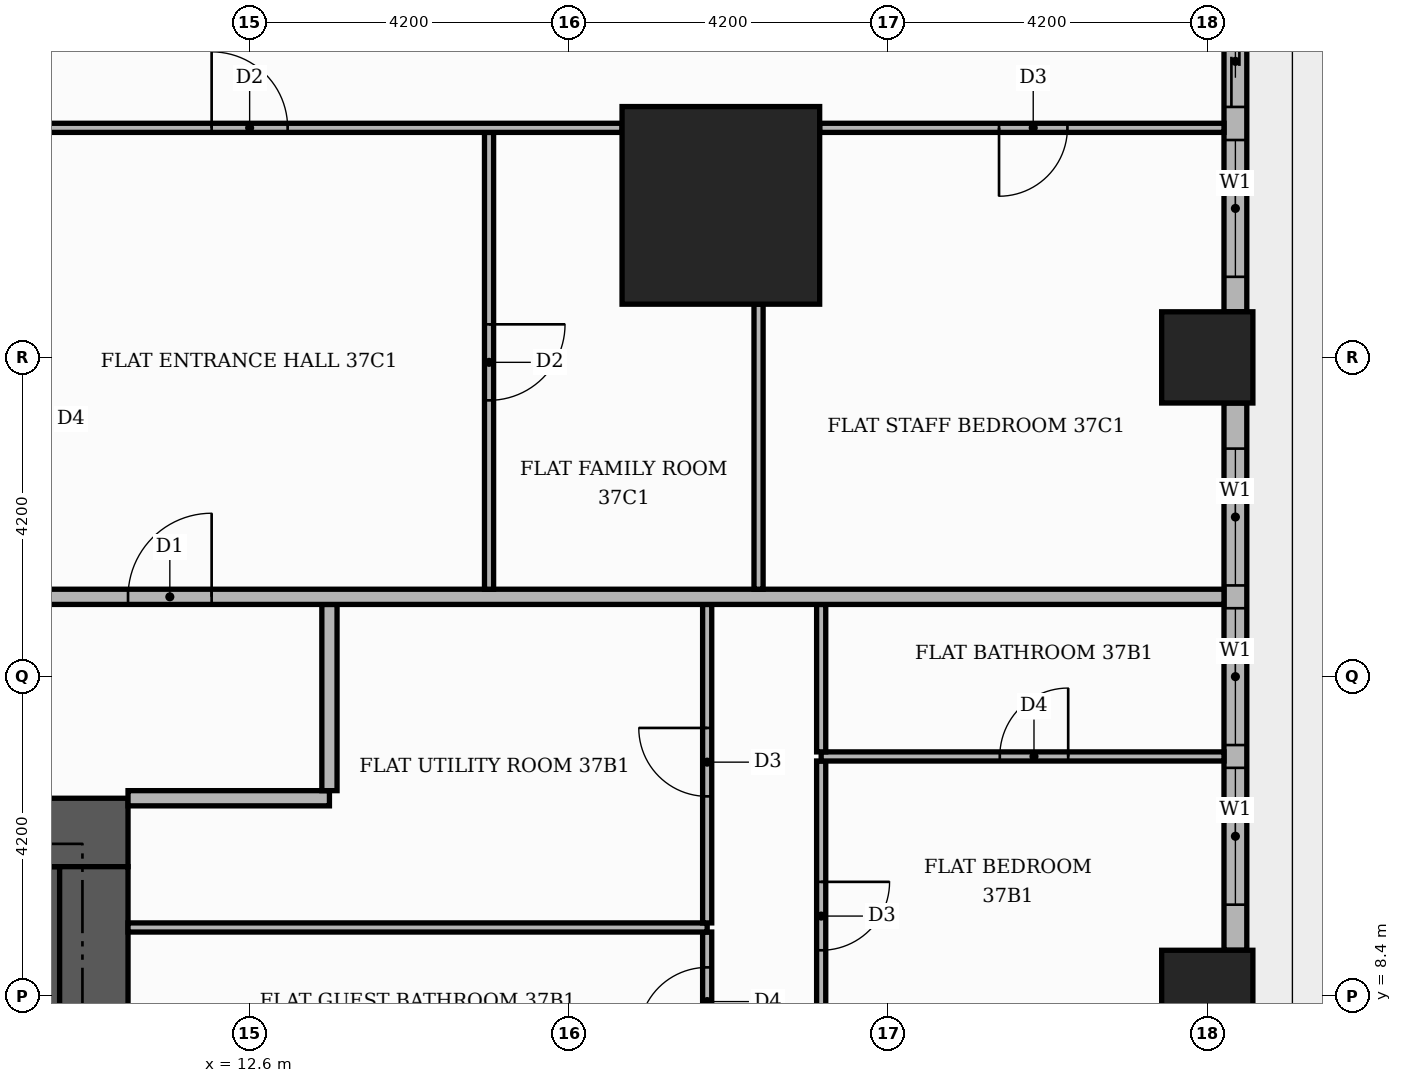
"""IFC4 building model, lengths in metres.
Left out: names, types, materials, properties, quantities, classifications, styles, units other than length and angle.
Written with IfcOpenShell. Run it as: python <this file> out.ifc"""

import sys

from ifc_helpers import new_model, si_unit, direction, frame, frame_2d, origin, origin_2d, place, context, subcontext, project, spatial, rectangle, extrude, element, fill, save


model = new_model("IFC4")
c1 = context("Model", 3, precision=1e-05, world=origin(), true_north=direction((0.0, 1.0)))
c2 = subcontext(c1, "Body", "Model", "MODEL_VIEW")
j1 = project(units=[si_unit("LENGTHUNIT", "METRE"), si_unit("PLANEANGLEUNIT", "RADIAN")], contexts=[c1])
p1 = place(None, origin())
s1 = spatial("IfcSite", under=j1, at=p1, CompositionType="ELEMENT")
p2 = place(p1, origin())
s2 = spatial("IfcBuilding", under=s1, at=p2, CompositionType="ELEMENT")
p3 = place(p2, frame((0.0, 0.0, 157.2)))
s3 = spatial("IfcBuildingStorey", under=s2, at=p3, CompositionType="ELEMENT", Elevation=157.2)
p4 = place(p3, frame((5.5, 9.15, 0.0), z_axis=(0.0, 0.0, 1.0), x_axis=(1.0, 0.0, 0.0)))
e1 = element("IfcWall", 1, at=p4, inside=s3, PredefinedType="SHEAR", context=c2, shape_type="SweptSolid", body=[
    extrude(rectangle(XDim=4.6, YDim=1.9, at=frame_2d((2.3, 0.0))), origin(), (0.0, 0.0, 1.0), 3.48),
])
p5 = place(p3, frame((-11.0, 10.55, 0.0), z_axis=(0.0, 0.0, 1.0), x_axis=(1.0, 0.0, 0.0)))
e2 = element("IfcWall", 2, at=p5, inside=s3, PredefinedType="SHEAR", context=c2, shape_type="SweptSolid", body=[
    extrude(rectangle(XDim=22.0, YDim=0.9, at=frame_2d((11.0, 0.0))), origin(), (0.0, 0.0, 1.0), 3.48),
])
p6 = place(p5, frame((13.3, 0.0, 0.0)))
e3 = element("IfcOpeningElement", 3, at=p6, cuts=e2, PredefinedType="OPENING", context=c2, shape_type="SweptSolid", body=[
    extrude(rectangle(XDim=1.8, YDim=2.2, at=frame_2d((0.9, 1.1))), frame((0.0, 0.46, 0.0), z_axis=(0.0, -1.0, 0.0), x_axis=(1.0, 0.0, 0.0)), (0.0, 0.0, 1.0), 0.92),
])
p7 = place(p3, frame((10.55, -10.1, 0.0), z_axis=(0.0, 0.0, 1.0), x_axis=(0.0, 1.0, 0.0)))
e4 = element("IfcWall", 4, at=p7, inside=s3, PredefinedType="SHEAR", context=c2, shape_type="SweptSolid", body=[
    extrude(rectangle(XDim=20.2, YDim=0.9, at=frame_2d((10.1, 0.0))), origin(), (0.0, 0.0, 1.0), 3.48),
])
p8 = place(p3, frame((18.8, 18.8, 0.0), z_axis=(0.0, 0.0, 1.0), x_axis=(1.0, 0.0, 0.0)))
e5 = element("IfcColumn", 5, at=p8, inside=s3, PredefinedType="COLUMN", context=c2, shape_type="SweptSolid", body=[
    extrude(rectangle(XDim=2.6, YDim=2.6, at=origin_2d()), origin(), (0.0, 0.0, 1.0), 3.9),
])
for number, where, z_axis, x_axis in (
    (6, (25.2, 8.4, 0.0), (0.0, 0.0, 1.0), (1.0, 0.0, 0.0)),
    (7, (25.2, 16.8, 0.0), (0.0, 0.0, 1.0), (1.0, 0.0, 0.0)),
):
    element("IfcColumn", number, at=place(p3, frame(where, z_axis=z_axis, x_axis=x_axis)), inside=s3, PredefinedType="COLUMN", context=c2, shape_type="SweptSolid", body=[
        extrude(rectangle(XDim=1.2, YDim=1.2, at=origin_2d()), origin(), (0.0, 0.0, 1.0), 3.9),
    ])
p9 = place(p3, frame((25.57, 9.0, 0.0), z_axis=(0.0, 0.0, 1.0), x_axis=(0.0, 1.0, 0.0)))
e8 = element("IfcWall", 8, at=p9, inside=s3, PredefinedType="STANDARD", context=c2, shape_type="SweptSolid", body=[
    extrude(rectangle(XDim=7.2, YDim=0.3, at=frame_2d((3.6, 0.0))), origin(), (0.0, 0.0, 1.0), 3.48),
])
p10 = place(p9, frame((0.6, 0.0, 0.9)))
e9 = element("IfcOpeningElement", 9, at=p10, cuts=e8, PredefinedType="OPENING", context=c2, shape_type="SweptSolid", body=[
    extrude(rectangle(XDim=1.8, YDim=2.1, at=frame_2d((0.9, 1.05))), frame((0.0, 0.16, 0.0), z_axis=(0.0, -1.0, 0.0), x_axis=(1.0, 0.0, 0.0)), (0.0, 0.0, 1.0), 0.32),
])
p11 = place(p9, frame((2.7, 0.0, 0.9)))
e10 = element("IfcOpeningElement", 10, at=p11, cuts=e8, PredefinedType="OPENING", context=c2, shape_type="SweptSolid", body=[
    extrude(rectangle(XDim=1.8, YDim=2.1, at=frame_2d((0.9, 1.05))), frame((0.0, 0.16, 0.0), z_axis=(0.0, -1.0, 0.0), x_axis=(1.0, 0.0, 0.0)), (0.0, 0.0, 1.0), 0.32),
])
p12 = place(p9, frame((4.8, 0.0, 0.9)))
e11 = element("IfcOpeningElement", 11, at=p12, cuts=e8, PredefinedType="OPENING", context=c2, shape_type="SweptSolid", body=[
    extrude(rectangle(XDim=1.8, YDim=2.1, at=frame_2d((0.9, 1.05))), frame((0.0, 0.16, 0.0), z_axis=(0.0, -1.0, 0.0), x_axis=(1.0, 0.0, 0.0)), (0.0, 0.0, 1.0), 0.32),
])
p13 = place(p3, frame((25.57, 17.4, 0.0), z_axis=(0.0, 0.0, 1.0), x_axis=(0.0, 1.0, 0.0)))
e12 = element("IfcWall", 12, at=p13, inside=s3, PredefinedType="STANDARD", context=c2, shape_type="SweptSolid", body=[
    extrude(rectangle(XDim=4.32, YDim=0.3, at=frame_2d((2.16, 0.0))), origin(), (0.0, 0.0, 1.0), 3.48),
])
p14 = place(p13, frame((2.695, 0.0, 0.0)))
e13 = element("IfcOpeningElement", 13, at=p14, cuts=e12, PredefinedType="OPENING", context=c2, shape_type="SweptSolid", body=[
    extrude(rectangle(XDim=1.2, YDim=2.4, at=frame_2d((0.6, 1.2))), frame((0.0, 0.16, 0.0), z_axis=(0.0, -1.0, 0.0), x_axis=(1.0, 0.0, 0.0)), (0.0, 0.0, 1.0), 0.32),
])
p15 = place(p13, frame((0.46, 0.0, 0.9)))
e14 = element("IfcOpeningElement", 14, at=p15, cuts=e12, PredefinedType="OPENING", context=c2, shape_type="SweptSolid", body=[
    extrude(rectangle(XDim=1.8, YDim=2.1, at=frame_2d((0.9, 1.05))), frame((0.0, 0.16, 0.0), z_axis=(0.0, -1.0, 0.0), x_axis=(1.0, 0.0, 0.0)), (0.0, 0.0, 1.0), 0.32),
])
p16 = place(p3, frame((18.62, 7.41, 0.0), z_axis=(0.0, 0.0, 1.0), x_axis=(0.0, 1.0, 0.0)))
e15 = element("IfcWall", 15, at=p16, inside=s3, PredefinedType="PARTITIONING", context=c2, shape_type="SweptSolid", body=[
    extrude(rectangle(XDim=1.83, YDim=0.12, at=frame_2d((0.915, 0.0))), origin(), (0.0, 0.0, 1.0), 3.48),
])
p17 = place(p16, frame((0.465, 0.0, 0.0)))
e16 = element("IfcOpeningElement", 16, at=p17, cuts=e15, PredefinedType="OPENING", context=c2, shape_type="SweptSolid", body=[
    extrude(rectangle(XDim=0.9, YDim=2.1, at=frame_2d((0.45, 1.05))), frame((0.0, 0.07, 0.0), z_axis=(0.0, -1.0, 0.0), x_axis=(1.0, 0.0, 0.0)), (0.0, 0.0, 1.0), 0.14),
])
p18 = place(p3, frame((20.12, 7.41, 0.0), z_axis=(0.0, 0.0, 1.0), x_axis=(0.0, 1.0, 0.0)))
e17 = element("IfcWall", 17, at=p18, inside=s3, PredefinedType="PARTITIONING", context=c2, shape_type="SweptSolid", body=[
    extrude(rectangle(XDim=4.08, YDim=0.12, at=frame_2d((2.04, 0.0))), origin(), (0.0, 0.0, 1.0), 3.48),
])
p19 = place(p18, frame((1.59, 0.0, 0.0)))
e18 = element("IfcOpeningElement", 18, at=p19, cuts=e17, PredefinedType="OPENING", context=c2, shape_type="SweptSolid", body=[
    extrude(rectangle(XDim=0.9, YDim=2.1, at=frame_2d((0.45, 1.05))), frame((0.0, 0.07, 0.0), z_axis=(0.0, -1.0, 0.0), x_axis=(1.0, 0.0, 0.0)), (0.0, 0.0, 1.0), 0.14),
])
p20 = place(p3, frame((11.0, 9.3, 0.0), z_axis=(0.0, 0.0, 1.0), x_axis=(1.0, 0.0, 0.0)))
e19 = element("IfcWall", 19, at=p20, inside=s3, PredefinedType="PARTITIONING", context=c2, shape_type="SweptSolid", body=[
    extrude(rectangle(XDim=7.62, YDim=0.12, at=frame_2d((3.81, 0.0))), origin(), (0.0, 0.0, 1.0), 3.48),
])
p21 = place(p3, frame((18.62, 9.36, 0.0), z_axis=(0.0, 0.0, 1.0), x_axis=(0.0, 1.0, 0.0)))
e20 = element("IfcWall", 20, at=p21, inside=s3, PredefinedType="PARTITIONING", context=c2, shape_type="SweptSolid", body=[
    extrude(rectangle(XDim=4.19, YDim=0.12, at=frame_2d((2.095, 0.0))), origin(), (0.0, 0.0, 1.0), 3.48),
])
p22 = place(p21, frame((1.665, 0.0, 0.0)))
e21 = element("IfcOpeningElement", 21, at=p22, cuts=e20, PredefinedType="OPENING", context=c2, shape_type="SweptSolid", body=[
    extrude(rectangle(XDim=0.9, YDim=2.1, at=frame_2d((0.45, 1.05))), frame((0.0, 0.07, 0.0), z_axis=(0.0, -1.0, 0.0), x_axis=(1.0, 0.0, 0.0)), (0.0, 0.0, 1.0), 0.14),
])
p23 = place(p3, frame((11.0, 11.0, 0.0), z_axis=(0.0, 0.0, 1.0), x_axis=(1.0, 0.0, 0.0)))
e22 = element("IfcWall", 22, at=p23, inside=s3, PredefinedType="PARTITIONING", context=c2, shape_type="SweptSolid", body=[
    extrude(rectangle(XDim=2.65, YDim=0.2, at=frame_2d((1.325, 0.0))), origin(), (0.0, 0.0, 1.0), 3.48),
])
p24 = place(p3, frame((13.65, 11.1, 0.0), z_axis=(0.0, 0.0, 1.0), x_axis=(0.0, 1.0, 0.0)))
e23 = element("IfcWall", 23, at=p24, inside=s3, PredefinedType="PARTITIONING", context=c2, shape_type="SweptSolid", body=[
    extrude(rectangle(XDim=2.45, YDim=0.2, at=frame_2d((1.225, 0.0))), origin(), (0.0, 0.0, 1.0), 3.48),
])
p25 = place(p3, frame((20.12, 11.55, 0.0), z_axis=(0.0, 0.0, 1.0), x_axis=(1.0, 0.0, 0.0)))
e24 = element("IfcWall", 24, at=p25, inside=s3, PredefinedType="PARTITIONING", context=c2, shape_type="SweptSolid", body=[
    extrude(rectangle(XDim=5.3, YDim=0.12, at=frame_2d((2.65, 0.0))), origin(), (0.0, 0.0, 1.0), 3.48),
])
p26 = place(p25, frame((2.35, 0.0, 0.0)))
e25 = element("IfcOpeningElement", 25, at=p26, cuts=e24, PredefinedType="OPENING", context=c2, shape_type="SweptSolid", body=[
    extrude(rectangle(XDim=0.9, YDim=2.1, at=frame_2d((0.45, 1.05))), frame((0.0, 0.07, 0.0), z_axis=(0.0, -1.0, 0.0), x_axis=(1.0, 0.0, 0.0)), (0.0, 0.0, 1.0), 0.14),
])
p27 = place(p3, frame((20.12, 11.61, 0.0), z_axis=(0.0, 0.0, 1.0), x_axis=(0.0, 1.0, 0.0)))
e26 = element("IfcWall", 26, at=p27, inside=s3, PredefinedType="PARTITIONING", context=c2, shape_type="SweptSolid", body=[
    extrude(rectangle(XDim=1.94, YDim=0.12, at=frame_2d((0.97, 0.0))), origin(), (0.0, 0.0, 1.0), 3.48),
])
p28 = place(p3, frame((-13.65, 13.65, 0.0), z_axis=(0.0, 0.0, 1.0), x_axis=(1.0, 0.0, 0.0)))
e27 = element("IfcWall", 27, at=p28, inside=s3, PredefinedType="PARTITIONING", context=c2, shape_type="SweptSolid", body=[
    extrude(rectangle(XDim=39.07, YDim=0.2, at=frame_2d((19.535, 0.0))), origin(), (0.0, 0.0, 1.0), 3.48),
])
p29 = place(p28, frame((24.65, 0.0, 0.0)))
e28 = element("IfcOpeningElement", 28, at=p29, cuts=e27, PredefinedType="OPENING", context=c2, shape_type="SweptSolid", body=[
    extrude(rectangle(XDim=1.1, YDim=2.4, at=frame_2d((0.55, 1.2))), frame((0.0, 0.11, 0.0), z_axis=(0.0, -1.0, 0.0), x_axis=(1.0, 0.0, 0.0)), (0.0, 0.0, 1.0), 0.22),
])
p30 = place(p28, frame((12.05, 0.0, 0.0)))
e29 = element("IfcOpeningElement", 29, at=p30, cuts=e27, PredefinedType="OPENING", context=c2, shape_type="SweptSolid", body=[
    extrude(rectangle(XDim=1.1, YDim=2.4, at=frame_2d((0.55, 1.2))), frame((0.0, 0.11, 0.0), z_axis=(0.0, -1.0, 0.0), x_axis=(1.0, 0.0, 0.0)), (0.0, 0.0, 1.0), 0.22),
])
p31 = place(p3, frame((15.75, 13.75, 0.0), z_axis=(0.0, 0.0, 1.0), x_axis=(0.0, 1.0, 0.0)))
e30 = element("IfcWall", 30, at=p31, inside=s3, PredefinedType="PARTITIONING", context=c2, shape_type="SweptSolid", body=[
    extrude(rectangle(XDim=6.01, YDim=0.12, at=frame_2d((3.005, 0.0))), origin(), (0.0, 0.0, 1.0), 3.48),
])
p32 = place(p31, frame((2.485, 0.0, 0.0)))
e31 = element("IfcOpeningElement", 31, at=p32, cuts=e30, PredefinedType="OPENING", context=c2, shape_type="SweptSolid", body=[
    extrude(rectangle(XDim=1.0, YDim=2.1, at=frame_2d((0.5, 1.05))), frame((0.0, 0.07, 0.0), z_axis=(0.0, -1.0, 0.0), x_axis=(1.0, 0.0, 0.0)), (0.0, 0.0, 1.0), 0.14),
])
p33 = place(p3, frame((19.296, 13.75, 0.0), z_axis=(0.0, 0.0, 1.0), x_axis=(0.0, 1.0, 0.0)))
e32 = element("IfcWall", 32, at=p33, inside=s3, PredefinedType="PARTITIONING", context=c2, shape_type="SweptSolid", body=[
    extrude(rectangle(XDim=3.75, YDim=0.12, at=frame_2d((1.875, 0.0))), origin(), (0.0, 0.0, 1.0), 3.48),
])
p34 = place(p3, frame((9.45, 19.82, 0.0), z_axis=(0.0, 0.0, 1.0), x_axis=(1.0, 0.0, 0.0)))
e33 = element("IfcWall", 33, at=p34, inside=s3, PredefinedType="PARTITIONING", context=c2, shape_type="SweptSolid", body=[
    extrude(rectangle(XDim=8.05, YDim=0.12, at=frame_2d((4.025, 0.0))), origin(), (0.0, 0.0, 1.0), 3.48),
])
p35 = place(p34, frame((2.65, 0.0, 0.0)))
e34 = element("IfcOpeningElement", 34, at=p35, cuts=e33, PredefinedType="OPENING", context=c2, shape_type="SweptSolid", body=[
    extrude(rectangle(XDim=1.0, YDim=2.1, at=frame_2d((0.5, 1.05))), frame((0.0, 0.07, 0.0), z_axis=(0.0, -1.0, 0.0), x_axis=(1.0, 0.0, 0.0)), (0.0, 0.0, 1.0), 0.14),
])
p36 = place(p3, frame((20.1, 19.82, 0.0), z_axis=(0.0, 0.0, 1.0), x_axis=(1.0, 0.0, 0.0)))
e35 = element("IfcWall", 35, at=p36, inside=s3, PredefinedType="PARTITIONING", context=c2, shape_type="SweptSolid", body=[
    extrude(rectangle(XDim=5.32, YDim=0.12, at=frame_2d((2.66, 0.0))), origin(), (0.0, 0.0, 1.0), 3.48),
])
p37 = place(p36, frame((2.36, 0.0, 0.0)))
e36 = element("IfcOpeningElement", 36, at=p37, cuts=e35, PredefinedType="OPENING", context=c2, shape_type="SweptSolid", body=[
    extrude(rectangle(XDim=0.9, YDim=2.1, at=frame_2d((0.45, 1.05))), frame((0.0, 0.07, 0.0), z_axis=(0.0, -1.0, 0.0), x_axis=(1.0, 0.0, 0.0)), (0.0, 0.0, 1.0), 0.14),
])
p38 = place(p10, origin())
e37 = element("IfcWindow", 37, at=p38, inside=s3, PartitioningType="SINGLE_PANEL", PredefinedType="WINDOW", context=c2, shape_type="SweptSolid", body=[
    extrude(rectangle(XDim=1.8, YDim=2.1, at=frame_2d((0.9, 1.05))), frame((0.0, 0.03, 0.0), z_axis=(0.0, -1.0, 0.0), x_axis=(1.0, 0.0, 0.0)), (0.0, 0.0, 1.0), 0.06),
])
fill(e9, e37)
p39 = place(p11, origin())
e38 = element("IfcWindow", 38, at=p39, inside=s3, PartitioningType="SINGLE_PANEL", PredefinedType="WINDOW", context=c2, shape_type="SweptSolid", body=[
    extrude(rectangle(XDim=1.8, YDim=2.1, at=frame_2d((0.9, 1.05))), frame((0.0, 0.03, 0.0), z_axis=(0.0, -1.0, 0.0), x_axis=(1.0, 0.0, 0.0)), (0.0, 0.0, 1.0), 0.06),
])
fill(e10, e38)
p40 = place(p12, origin())
e39 = element("IfcWindow", 39, at=p40, inside=s3, PartitioningType="SINGLE_PANEL", PredefinedType="WINDOW", context=c2, shape_type="SweptSolid", body=[
    extrude(rectangle(XDim=1.8, YDim=2.1, at=frame_2d((0.9, 1.05))), frame((0.0, 0.03, 0.0), z_axis=(0.0, -1.0, 0.0), x_axis=(1.0, 0.0, 0.0)), (0.0, 0.0, 1.0), 0.06),
])
fill(e11, e39)
p41 = place(p14, origin())
e40 = element("IfcDoor", 40, at=p41, inside=s3, OperationType="SLIDING_TO_LEFT", PredefinedType="DOOR", context=c2, shape_type="SweptSolid", body=[
    extrude(rectangle(XDim=1.2, YDim=2.4, at=frame_2d((0.6, 1.2))), frame((0.0, 0.025, 0.0), z_axis=(0.0, -1.0, 0.0), x_axis=(1.0, 0.0, 0.0)), (0.0, 0.0, 1.0), 0.05),
])
fill(e13, e40)
p42 = place(p15, origin())
e41 = element("IfcWindow", 41, at=p42, inside=s3, PartitioningType="SINGLE_PANEL", PredefinedType="WINDOW", context=c2, shape_type="SweptSolid", body=[
    extrude(rectangle(XDim=1.8, YDim=2.1, at=frame_2d((0.9, 1.05))), frame((0.0, 0.03, 0.0), z_axis=(0.0, -1.0, 0.0), x_axis=(1.0, 0.0, 0.0)), (0.0, 0.0, 1.0), 0.06),
])
fill(e14, e41)
p43 = place(p17, origin())
e42 = element("IfcDoor", 42, at=p43, inside=s3, OperationType="SINGLE_SWING_LEFT", PredefinedType="DOOR", context=c2, shape_type="SweptSolid", body=[
    extrude(rectangle(XDim=0.9, YDim=2.1, at=frame_2d((0.45, 1.05))), frame((0.0, 0.025, 0.0), z_axis=(0.0, -1.0, 0.0), x_axis=(1.0, 0.0, 0.0)), (0.0, 0.0, 1.0), 0.05),
])
fill(e16, e42)
p44 = place(p22, origin())
e43 = element("IfcDoor", 43, at=p44, inside=s3, OperationType="SINGLE_SWING_RIGHT", PredefinedType="DOOR", context=c2, shape_type="SweptSolid", body=[
    extrude(rectangle(XDim=0.9, YDim=2.1, at=frame_2d((0.45, 1.05))), frame((0.0, 0.025, 0.0), z_axis=(0.0, -1.0, 0.0), x_axis=(1.0, 0.0, 0.0)), (0.0, 0.0, 1.0), 0.05),
])
fill(e21, e43)
p45 = place(p19, frame((0.9, 0.0, 0.0), z_axis=(0.0, 0.0, 1.0), x_axis=(-1.0, 0.0, 0.0)))
e44 = element("IfcDoor", 44, at=p45, inside=s3, OperationType="SINGLE_SWING_RIGHT", PredefinedType="DOOR", context=c2, shape_type="SweptSolid", body=[
    extrude(rectangle(XDim=0.9, YDim=2.1, at=frame_2d((0.45, 1.05))), frame((0.0, 0.025, 0.0), z_axis=(0.0, -1.0, 0.0), x_axis=(1.0, 0.0, 0.0)), (0.0, 0.0, 1.0), 0.05),
])
fill(e18, e44)
p46 = place(p26, origin())
e45 = element("IfcDoor", 45, at=p46, inside=s3, OperationType="SINGLE_SWING_RIGHT", PredefinedType="DOOR", context=c2, shape_type="SweptSolid", body=[
    extrude(rectangle(XDim=0.9, YDim=2.1, at=frame_2d((0.45, 1.05))), frame((0.0, 0.025, 0.0), z_axis=(0.0, -1.0, 0.0), x_axis=(1.0, 0.0, 0.0)), (0.0, 0.0, 1.0), 0.05),
])
fill(e25, e45)
p47 = place(p29, origin())
e46 = element("IfcDoor", 46, at=p47, inside=s3, OperationType="SINGLE_SWING_RIGHT", PredefinedType="DOOR", context=c2, shape_type="SweptSolid", body=[
    extrude(rectangle(XDim=1.1, YDim=2.4, at=frame_2d((0.55, 1.2))), frame((0.0, 0.025, 0.0), z_axis=(0.0, -1.0, 0.0), x_axis=(1.0, 0.0, 0.0)), (0.0, 0.0, 1.0), 0.05),
])
fill(e28, e46)
p48 = place(p37, frame((0.9, 0.0, 0.0), z_axis=(0.0, 0.0, 1.0), x_axis=(-1.0, 0.0, 0.0)))
e47 = element("IfcDoor", 47, at=p48, inside=s3, OperationType="SINGLE_SWING_LEFT", PredefinedType="DOOR", context=c2, shape_type="SweptSolid", body=[
    extrude(rectangle(XDim=0.9, YDim=2.1, at=frame_2d((0.45, 1.05))), frame((0.0, 0.025, 0.0), z_axis=(0.0, -1.0, 0.0), x_axis=(1.0, 0.0, 0.0)), (0.0, 0.0, 1.0), 0.05),
])
fill(e36, e47)
p49 = place(p32, frame((1.0, 0.0, 0.0), z_axis=(0.0, 0.0, 1.0), x_axis=(-1.0, 0.0, 0.0)))
e48 = element("IfcDoor", 48, at=p49, inside=s3, OperationType="SINGLE_SWING_RIGHT", PredefinedType="DOOR", context=c2, shape_type="SweptSolid", body=[
    extrude(rectangle(XDim=1.0, YDim=2.1, at=frame_2d((0.5, 1.05))), frame((0.0, 0.025, 0.0), z_axis=(0.0, -1.0, 0.0), x_axis=(1.0, 0.0, 0.0)), (0.0, 0.0, 1.0), 0.05),
])
fill(e31, e48)
p50 = place(p35, origin())
e49 = element("IfcDoor", 49, at=p50, inside=s3, OperationType="SINGLE_SWING_LEFT", PredefinedType="DOOR", context=c2, shape_type="SweptSolid", body=[
    extrude(rectangle(XDim=1.0, YDim=2.1, at=frame_2d((0.5, 1.05))), frame((0.0, 0.025, 0.0), z_axis=(0.0, -1.0, 0.0), x_axis=(1.0, 0.0, 0.0)), (0.0, 0.0, 1.0), 0.05),
])
fill(e34, e49)
save(model, sys.argv[1])
